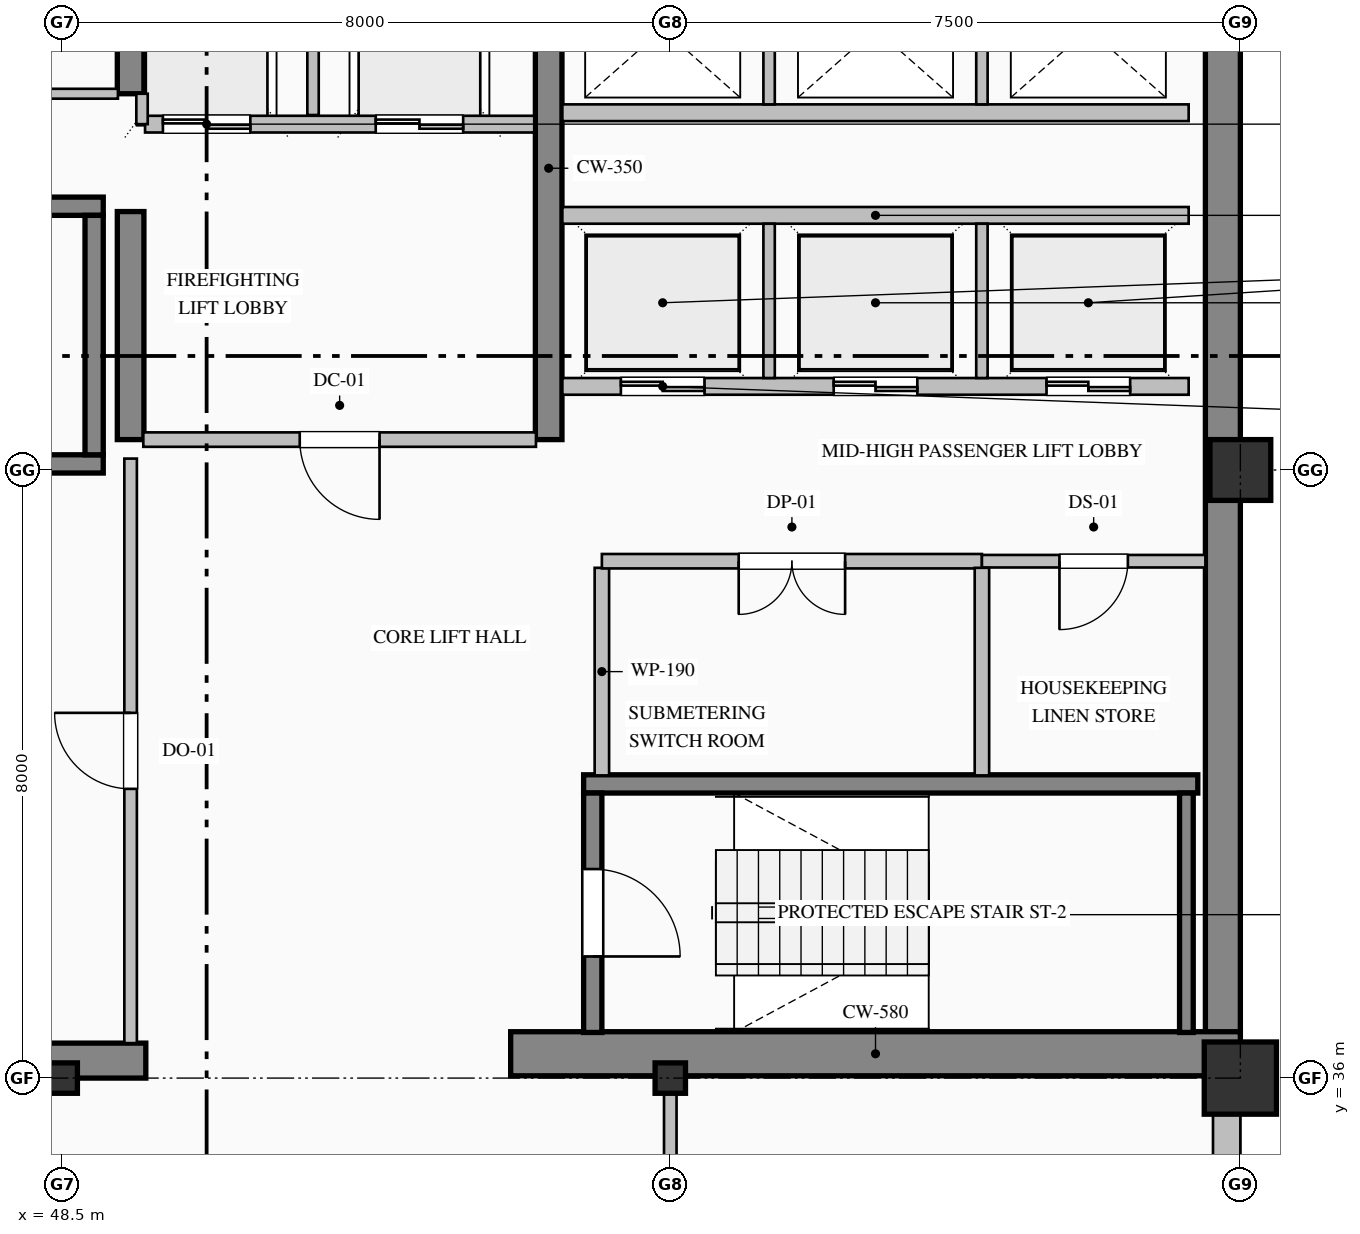
"""IFC4 building model, lengths in metres.
Left out: names, types, materials, properties, quantities, classifications, styles, units other than length and angle.
Written with IfcOpenShell. Run it as: python <this file> out.ifc"""

import sys

from ifc_helpers import new_model, si_unit, direction, frame, frame_2d, origin, origin_2d, place, context, subcontext, project, spatial, rectangle, hollow_rectangle, i_section, extrude, element, fill, save


model = new_model("IFC4")
c1 = context("Model", 3, precision=1e-05, world=origin(), true_north=direction((0.0, 1.0)))
c2 = subcontext(c1, "Body", "Model", "MODEL_VIEW")
j1 = project(units=[si_unit("LENGTHUNIT", "METRE"), si_unit("PLANEANGLEUNIT", "RADIAN")], contexts=[c1])
p1 = place(None, origin())
s1 = spatial("IfcSite", under=j1, at=p1, CompositionType="ELEMENT")
p2 = place(p1, origin())
s2 = spatial("IfcBuilding", under=s1, at=p2, CompositionType="ELEMENT")
p3 = place(p2, frame((0.0, 0.0, 229.8)))
s3 = spatial("IfcBuildingStorey", under=s2, at=p3, CompositionType="ELEMENT", Elevation=229.8)
p4 = place(p3, frame((63.77, 36.32, 0.0), z_axis=(0.0, 0.0, 1.0), x_axis=(0.0, 1.0, 0.0)))
e1 = element("IfcWall", 1, at=p4, inside=s3, PredefinedType="SHEAR", context=c2, shape_type="SweptSolid", body=[
    extrude(rectangle(XDim=15.22, YDim=0.46, at=frame_2d((7.61, 0.0))), origin(), (0.0, 0.0, 1.0), 3.775),
])
p5 = place(p3, frame((40.5, 36.23, 0.0), z_axis=(0.0, 0.0, 1.0), x_axis=(1.0, 0.0, 0.0)))
e2 = element("IfcWall", 2, at=p5, inside=s3, PredefinedType="SHEAR", context=c2, shape_type="SweptSolid", body=[
    extrude(rectangle(XDim=9.1, YDim=0.46, at=frame_2d((4.55, 0.0))), origin(), (0.0, 0.0, 1.0), 3.775),
])
p6 = place(p3, frame((54.4, 36.32, 0.0), z_axis=(0.0, 0.0, 1.0), x_axis=(1.0, 0.0, 0.0)))
e3 = element("IfcWall", 3, at=p6, inside=s3, PredefinedType="SHEAR", context=c2, shape_type="SweptSolid", body=[
    extrude(rectangle(XDim=9.6, YDim=0.58, at=frame_2d((4.8, 0.0))), origin(), (0.0, 0.0, 1.0), 4.0),
])
p7 = place(p3, frame((49.4, 44.4, 0.0), z_axis=(0.0, 0.0, 1.0), x_axis=(0.0, 1.0, 0.0)))
e4 = element("IfcWall", 4, at=p7, inside=s3, PredefinedType="SHEAR", context=c2, shape_type="SweptSolid", body=[
    extrude(rectangle(XDim=3.0, YDim=0.35, at=frame_2d((1.5, 0.0))), origin(), (0.0, 0.0, 1.0), 3.775),
])
p8 = place(p3, frame((49.4, 48.95, 0.0), z_axis=(0.0, 0.0, 1.0), x_axis=(0.0, 1.0, 0.0)))
e5 = element("IfcWall", 5, at=p8, inside=s3, PredefinedType="SHEAR", context=c2, shape_type="SweptSolid", body=[
    extrude(rectangle(XDim=2.59, YDim=0.35, at=frame_2d((1.295, 0.0))), origin(), (0.0, 0.0, 1.0), 3.775),
])
p9 = place(p3, frame((54.9, 44.4, 0.0), z_axis=(0.0, 0.0, 1.0), x_axis=(0.0, 1.0, 0.0)))
e6 = element("IfcWall", 6, at=p9, inside=s3, PredefinedType="SHEAR", context=c2, shape_type="SweptSolid", body=[
    extrude(rectangle(XDim=7.14, YDim=0.35, at=frame_2d((3.57, 0.0))), origin(), (0.0, 0.0, 1.0), 3.775),
])
for number, where, z_axis, x_axis in (
    (7, (48.5, 36.0, 0.0), (0.0, 0.0, 1.0), (1.0, 0.0, 0.0)),
    (8, (56.5, 36.0, 0.0), (0.0, 0.0, 1.0), (1.0, 0.0, 0.0)),
):
    element("IfcColumn", number, at=place(p3, frame(where, z_axis=z_axis, x_axis=x_axis)), inside=s3, PredefinedType="COLUMN", context=c2, shape_type="SweptSolid", body=[
        extrude(i_section(OverallWidth=0.4, OverallDepth=0.4, WebThickness=0.013, FlangeThickness=0.021, FilletRadius=0.022, at=origin_2d()), origin(), (0.0, 0.0, 1.0), 4.0),
    ])
p10 = place(p3, frame((64.0, 36.0, 0.0), z_axis=(0.0, 0.0, 1.0), x_axis=(1.0, 0.0, 0.0)))
e9 = element("IfcColumn", 9, at=p10, inside=s3, PredefinedType="COLUMN", context=c2, shape_type="SweptSolid", body=[
    extrude(hollow_rectangle(XDim=0.95, YDim=0.95, WallThickness=0.036, at=origin_2d()), origin(), (0.0, 0.0, 1.0), 4.0),
])
p11 = place(p3, frame((64.0, 44.0, 0.0), z_axis=(0.0, 0.0, 1.0), x_axis=(1.0, 0.0, 0.0)))
e10 = element("IfcColumn", 10, at=p11, inside=s3, PredefinedType="COLUMN", context=c2, shape_type="SweptSolid", body=[
    extrude(hollow_rectangle(XDim=0.8, YDim=0.8, WallThickness=0.032, at=origin_2d()), origin(), (0.0, 0.0, 1.0), 4.0),
])
p12 = place(p3, frame((63.82, 36.05, 0.0), z_axis=(0.0, 0.0, 1.0), x_axis=(0.0, -1.0, 0.0)))
e11 = element("IfcWall", 11, at=p12, inside=s3, PredefinedType="SOLIDWALL", context=c2, shape_type="SweptSolid", body=[
    extrude(rectangle(XDim=19.55, YDim=0.36, at=frame_2d((9.775, 0.0))), origin(), (0.0, 0.0, 1.0), 3.325),
])
p13 = place(p12, frame((2.925, 0.0, 0.9)))
e12 = element("IfcOpeningElement", 12, at=p13, cuts=e11, PredefinedType="OPENING", context=c2, shape_type="SweptSolid", body=[
    extrude(rectangle(XDim=1.35, YDim=1.85, at=frame_2d((0.675, 0.925))), frame((0.0, 0.19, 0.0), z_axis=(0.0, -1.0, 0.0), x_axis=(1.0, 0.0, 0.0)), (0.0, 0.0, 1.0), 0.38),
])
p14 = place(p12, frame((10.2, 0.0, 0.9)))
e13 = element("IfcOpeningElement", 13, at=p14, cuts=e11, PredefinedType="OPENING", context=c2, shape_type="SweptSolid", body=[
    extrude(rectangle(XDim=1.2, YDim=1.85, at=frame_2d((0.6, 0.925))), frame((0.0, 0.19, 0.0), z_axis=(0.0, -1.0, 0.0), x_axis=(1.0, 0.0, 0.0)), (0.0, 0.0, 1.0), 0.38),
])
p15 = place(p12, frame((13.725, 0.0, 0.9)))
e14 = element("IfcOpeningElement", 14, at=p15, cuts=e11, PredefinedType="OPENING", context=c2, shape_type="SweptSolid", body=[
    extrude(rectangle(XDim=1.35, YDim=1.85, at=frame_2d((0.675, 0.925))), frame((0.0, 0.19, 0.0), z_axis=(0.0, -1.0, 0.0), x_axis=(1.0, 0.0, 0.0)), (0.0, 0.0, 1.0), 0.38),
])
for number, where, z_axis, x_axis in (
    (15, (40.96, 47.47, 0.0), (0.0, 0.0, 1.0), (1.0, 0.0, 0.0)),
    (16, (49.04, 44.08, 0.0), (0.0, 0.0, 1.0), (-1.0, 0.0, 0.0)),
):
    element("IfcWall", number, at=place(p3, frame(where, z_axis=z_axis, x_axis=x_axis)), inside=s3, PredefinedType="SOLIDWALL", context=c2, shape_type="SweptSolid", body=[
        extrude(rectangle(XDim=8.08, YDim=0.24, at=frame_2d((4.04, 0.0))), origin(), (0.0, 0.0, 1.0), 4.0),
    ])
p16 = place(p3, frame((48.92, 44.2, 0.0), z_axis=(0.0, 0.0, 1.0), x_axis=(0.0, 1.0, 0.0)))
e17 = element("IfcWall", 17, at=p16, inside=s3, PredefinedType="SOLIDWALL", context=c2, shape_type="SweptSolid", body=[
    extrude(rectangle(XDim=3.15, YDim=0.24, at=frame_2d((1.575, 0.0))), origin(), (0.0, 0.0, 1.0), 4.0),
])
p17 = place(p3, frame((55.36, 39.87, 0.0), z_axis=(0.0, 0.0, 1.0), x_axis=(1.0, 0.0, 0.0)))
e18 = element("IfcWall", 18, at=p17, inside=s3, PredefinedType="SOLIDWALL", context=c2, shape_type="SweptSolid", body=[
    extrude(rectangle(XDim=8.08, YDim=0.24, at=frame_2d((4.04, 0.0))), origin(), (0.0, 0.0, 1.0), 4.0),
])
p18 = place(p3, frame((55.48, 39.75, 0.0), z_axis=(0.0, 0.0, 1.0), x_axis=(0.0, -1.0, 0.0)))
e19 = element("IfcWall", 19, at=p18, inside=s3, PredefinedType="SOLIDWALL", context=c2, shape_type="SweptSolid", body=[
    extrude(rectangle(XDim=3.15, YDim=0.24, at=frame_2d((1.575, 0.0))), origin(), (0.0, 0.0, 1.0), 4.0),
])
p19 = place(p18, frame((1.0, 0.0, 0.0)))
e20 = element("IfcOpeningElement", 20, at=p19, cuts=e19, PredefinedType="OPENING", context=c2, shape_type="SweptSolid", body=[
    extrude(rectangle(XDim=1.15, YDim=2.2, at=frame_2d((0.575, 1.1))), frame((0.0, 0.13, 0.0), z_axis=(0.0, -1.0, 0.0), x_axis=(1.0, 0.0, 0.0)), (0.0, 0.0, 1.0), 0.26),
])
p20 = place(p3, frame((63.29, 36.6, 0.0), z_axis=(0.0, 0.0, 1.0), x_axis=(0.0, 1.0, 0.0)))
e21 = element("IfcWall", 21, at=p20, inside=s3, PredefinedType="SOLIDWALL", context=c2, shape_type="SweptSolid", body=[
    extrude(rectangle(XDim=3.15, YDim=0.18, at=frame_2d((1.575, 0.0))), origin(), (0.0, 0.0, 1.0), 4.0),
])
p21 = place(p3, frame((54.71, 48.55, 0.0), z_axis=(0.0, 0.0, 1.0), x_axis=(-1.0, 0.0, 0.0)))
e22 = element("IfcWall", 22, at=p21, inside=s3, PredefinedType="PARTITIONING", context=c2, shape_type="SweptSolid", body=[
    extrude(rectangle(XDim=5.12, YDim=0.22, at=frame_2d((2.56, 0.0))), origin(), (0.0, 0.0, 1.0), 3.775),
])
p22 = place(p21, frame((3.735, 0.0, 0.0)))
e23 = element("IfcOpeningElement", 23, at=p22, cuts=e22, PredefinedType="OPENING", context=c2, shape_type="SweptSolid", body=[
    extrude(rectangle(XDim=1.15, YDim=2.2, at=frame_2d((0.575, 1.1))), frame((0.0, 0.12, 0.0), z_axis=(0.0, -1.0, 0.0), x_axis=(1.0, 0.0, 0.0)), (0.0, 0.0, 1.0), 0.24),
])
p23 = place(p21, frame((0.935, 0.0, 0.0)))
e24 = element("IfcOpeningElement", 24, at=p23, cuts=e22, PredefinedType="OPENING", context=c2, shape_type="SweptSolid", body=[
    extrude(rectangle(XDim=1.15, YDim=2.2, at=frame_2d((0.575, 1.1))), frame((0.0, 0.12, 0.0), z_axis=(0.0, -1.0, 0.0), x_axis=(1.0, 0.0, 0.0)), (0.0, 0.0, 1.0), 0.24),
])
p24 = place(p3, frame((51.8, 48.67, 0.0), z_axis=(0.0, 0.0, 1.0), x_axis=(0.0, 1.0, 0.0)))
e25 = element("IfcWall", 25, at=p24, inside=s3, PredefinedType="PARTITIONING", context=c2, shape_type="SweptSolid", body=[
    extrude(rectangle(XDim=2.87, YDim=0.15, at=frame_2d((1.435, 0.0))), origin(), (0.0, 0.0, 1.0), 3.775),
])
p25 = place(p3, frame((49.55, 48.55, 0.0), z_axis=(0.0, 0.0, 1.0), x_axis=(0.0, 1.0, 0.0)))
e26 = element("IfcWall", 26, at=p25, inside=s3, PredefinedType="PARTITIONING", context=c2, shape_type="SweptSolid", body=[
    extrude(rectangle(XDim=0.4, YDim=0.15, at=frame_2d((0.2, 0.0))), origin(), (0.0, 0.0, 1.0), 3.775),
])
p26 = place(p3, frame((63.32, 45.1, 0.0), z_axis=(0.0, 0.0, 1.0), x_axis=(-1.0, 0.0, 0.0)))
e27 = element("IfcWall", 27, at=p26, inside=s3, PredefinedType="PARTITIONING", context=c2, shape_type="SweptSolid", body=[
    extrude(rectangle(XDim=8.24, YDim=0.22, at=frame_2d((4.12, 0.0))), origin(), (0.0, 0.0, 1.0), 3.775),
])
p27 = place(p26, frame((6.37, 0.0, 0.0)))
e28 = element("IfcOpeningElement", 28, at=p27, cuts=e27, PredefinedType="OPENING", context=c2, shape_type="SweptSolid", body=[
    extrude(rectangle(XDim=1.1, YDim=2.2, at=frame_2d((0.55, 1.1))), frame((0.0, 0.12, 0.0), z_axis=(0.0, -1.0, 0.0), x_axis=(1.0, 0.0, 0.0)), (0.0, 0.0, 1.0), 0.24),
])
p28 = place(p26, frame((3.57, 0.0, 0.0)))
e29 = element("IfcOpeningElement", 29, at=p28, cuts=e27, PredefinedType="OPENING", context=c2, shape_type="SweptSolid", body=[
    extrude(rectangle(XDim=1.1, YDim=2.2, at=frame_2d((0.55, 1.1))), frame((0.0, 0.12, 0.0), z_axis=(0.0, -1.0, 0.0), x_axis=(1.0, 0.0, 0.0)), (0.0, 0.0, 1.0), 0.24),
])
p29 = place(p26, frame((0.77, 0.0, 0.0)))
e30 = element("IfcOpeningElement", 30, at=p29, cuts=e27, PredefinedType="OPENING", context=c2, shape_type="SweptSolid", body=[
    extrude(rectangle(XDim=1.1, YDim=2.2, at=frame_2d((0.55, 1.1))), frame((0.0, 0.12, 0.0), z_axis=(0.0, -1.0, 0.0), x_axis=(1.0, 0.0, 0.0)), (0.0, 0.0, 1.0), 0.24),
])
p30 = place(p3, frame((55.08, 47.35, 0.0), z_axis=(0.0, 0.0, 1.0), x_axis=(1.0, 0.0, 0.0)))
e31 = element("IfcWall", 31, at=p30, inside=s3, PredefinedType="PARTITIONING", context=c2, shape_type="SweptSolid", body=[
    extrude(rectangle(XDim=8.24, YDim=0.22, at=frame_2d((4.12, 0.0))), origin(), (0.0, 0.0, 1.0), 3.775),
])
for number, where, z_axis, x_axis in (
    (32, (57.8, 45.21, 0.0), (0.0, 0.0, 1.0), (0.0, 1.0, 0.0)),
    (33, (60.6, 45.21, 0.0), (0.0, 0.0, 1.0), (0.0, 1.0, 0.0)),
):
    element("IfcWall", number, at=place(p3, frame(where, z_axis=z_axis, x_axis=x_axis)), inside=s3, PredefinedType="PARTITIONING", context=c2, shape_type="SweptSolid", body=[
        extrude(rectangle(XDim=2.03, YDim=0.15, at=frame_2d((1.015, 0.0))), origin(), (0.0, 0.0, 1.0), 3.775),
    ])
p31 = place(p3, frame((63.32, 48.7, 0.0), z_axis=(0.0, 0.0, 1.0), x_axis=(-1.0, 0.0, 0.0)))
e34 = element("IfcWall", 34, at=p31, inside=s3, PredefinedType="PARTITIONING", context=c2, shape_type="SweptSolid", body=[
    extrude(rectangle(XDim=8.24, YDim=0.22, at=frame_2d((4.12, 0.0))), origin(), (0.0, 0.0, 1.0), 3.775),
])
for number, where, z_axis, x_axis in (
    (35, (57.8, 48.81, 0.0), (0.0, 0.0, 1.0), (0.0, 1.0, 0.0)),
    (36, (60.6, 48.81, 0.0), (0.0, 0.0, 1.0), (0.0, 1.0, 0.0)),
):
    element("IfcWall", number, at=place(p3, frame(where, z_axis=z_axis, x_axis=x_axis)), inside=s3, PredefinedType="PARTITIONING", context=c2, shape_type="SweptSolid", body=[
        extrude(rectangle(XDim=2.73, YDim=0.15, at=frame_2d((1.365, 0.0))), origin(), (0.0, 0.0, 1.0), 3.775),
    ])
p32 = place(p3, frame((43.5, 48.95, 0.0), z_axis=(0.0, 0.0, 1.0), x_axis=(1.0, 0.0, 0.0)))
e37 = element("IfcWall", 37, at=p32, inside=s3, PredefinedType="PARTITIONING", context=c2, shape_type="SweptSolid", body=[
    extrude(rectangle(XDim=5.733, YDim=0.13, at=frame_2d((2.866, 0.0))), origin(), (0.0, 0.0, 1.0), 3.775),
])
p33 = place(p32, frame((2.406, 0.0, 0.0)))
e38 = element("IfcOpeningElement", 38, at=p33, cuts=e37, PredefinedType="OPENING", context=c2, shape_type="SweptSolid", body=[
    extrude(rectangle(XDim=0.92, YDim=2.15, at=frame_2d((0.46, 1.075))), frame((0.0, 0.075, 0.0), z_axis=(0.0, -1.0, 0.0), x_axis=(1.0, 0.0, 0.0)), (0.0, 0.0, 1.0), 0.15),
])
p34 = place(p3, frame((54.733, 44.4, 0.0), z_axis=(0.0, 0.0, 1.0), x_axis=(-1.0, 0.0, 0.0)))
e39 = element("IfcWall", 39, at=p34, inside=s3, PredefinedType="PARTITIONING", context=c2, shape_type="SweptSolid", body=[
    extrude(rectangle(XDim=5.166, YDim=0.19, at=frame_2d((2.583, 0.0))), origin(), (0.0, 0.0, 1.0), 3.775),
])
p35 = place(p34, frame((2.058, 0.0, 0.0)))
e40 = element("IfcOpeningElement", 40, at=p35, cuts=e39, PredefinedType="OPENING", context=c2, shape_type="SweptSolid", body=[
    extrude(rectangle(XDim=1.05, YDim=2.15, at=frame_2d((0.525, 1.075))), frame((0.0, 0.105, 0.0), z_axis=(0.0, -1.0, 0.0), x_axis=(1.0, 0.0, 0.0)), (0.0, 0.0, 1.0), 0.21),
])
p36 = place(p3, frame((49.4, 36.46, 0.0), z_axis=(0.0, 0.0, 1.0), x_axis=(0.0, 1.0, 0.0)))
e41 = element("IfcWall", 41, at=p36, inside=s3, PredefinedType="PARTITIONING", context=c2, shape_type="SweptSolid", body=[
    extrude(rectangle(XDim=7.69, YDim=0.165, at=frame_2d((3.845, 0.0))), origin(), (0.0, 0.0, 1.0), 3.017),
])
p37 = place(p36, frame((3.345, 0.0, 0.0)))
e42 = element("IfcOpeningElement", 42, at=p37, cuts=e41, PredefinedType="OPENING", context=c2, shape_type="SweptSolid", body=[
    extrude(rectangle(XDim=1.0, YDim=2.15, at=frame_2d((0.5, 1.075))), frame((0.0, 0.093, 0.0), z_axis=(0.0, -1.0, 0.0), x_axis=(1.0, 0.0, 0.0)), (0.0, 0.0, 1.0), 0.185),
])
p38 = place(p3, frame((55.6, 42.713, 0.0), z_axis=(0.0, 0.0, 1.0), x_axis=(0.0, -1.0, 0.0)))
e43 = element("IfcWall", 43, at=p38, inside=s3, PredefinedType="PARTITIONING", context=c2, shape_type="SweptSolid", body=[
    extrude(rectangle(XDim=2.731, YDim=0.19, at=frame_2d((1.365, 0.0))), origin(), (0.0, 0.0, 1.0), 3.775),
])
p39 = place(p3, frame((60.6, 42.8, 0.0), z_axis=(0.0, 0.0, 1.0), x_axis=(-1.0, 0.0, 0.0)))
e44 = element("IfcWall", 44, at=p39, inside=s3, PredefinedType="PARTITIONING", context=c2, shape_type="SweptSolid", body=[
    extrude(rectangle(XDim=5.0, YDim=0.19, at=frame_2d((2.5, 0.0))), origin(), (0.0, 0.0, 1.0), 3.775),
])
p40 = place(p39, frame((1.8, 0.0, 0.0)))
e45 = element("IfcOpeningElement", 45, at=p40, cuts=e44, PredefinedType="OPENING", context=c2, shape_type="SweptSolid", body=[
    extrude(rectangle(XDim=1.4, YDim=2.25, at=frame_2d((0.7, 1.125))), frame((0.0, 0.105, 0.0), z_axis=(0.0, -1.0, 0.0), x_axis=(1.0, 0.0, 0.0)), (0.0, 0.0, 1.0), 0.21),
])
p41 = place(p3, frame((63.54, 42.8, 0.0), z_axis=(0.0, 0.0, 1.0), x_axis=(-1.0, 0.0, 0.0)))
e46 = element("IfcWall", 46, at=p41, inside=s3, PredefinedType="PARTITIONING", context=c2, shape_type="SweptSolid", body=[
    extrude(rectangle(XDim=2.94, YDim=0.165, at=frame_2d((1.47, 0.0))), origin(), (0.0, 0.0, 1.0), 3.775),
])
p42 = place(p41, frame((1.02, 0.0, 0.0)))
e47 = element("IfcOpeningElement", 47, at=p42, cuts=e46, PredefinedType="OPENING", context=c2, shape_type="SweptSolid", body=[
    extrude(rectangle(XDim=0.9, YDim=2.15, at=frame_2d((0.45, 1.075))), frame((0.0, 0.093, 0.0), z_axis=(0.0, -1.0, 0.0), x_axis=(1.0, 0.0, 0.0)), (0.0, 0.0, 1.0), 0.185),
])
p43 = place(p3, frame((60.6, 42.713, 0.0), z_axis=(0.0, 0.0, 1.0), x_axis=(0.0, -1.0, 0.0)))
e48 = element("IfcWall", 48, at=p43, inside=s3, PredefinedType="PARTITIONING", context=c2, shape_type="SweptSolid", body=[
    extrude(rectangle(XDim=2.731, YDim=0.19, at=frame_2d((1.365, 0.0))), origin(), (0.0, 0.0, 1.0), 3.775),
])
p44 = place(p3, frame((56.5, 36.0, 0.0), z_axis=(0.0, 0.0, 1.0), x_axis=(0.0, -1.0, 0.0)))
e49 = element("IfcWall", 49, at=p44, inside=s3, PredefinedType="PARTITIONING", context=c2, shape_type="SweptSolid", body=[
    extrude(rectangle(XDim=5.525, YDim=0.165, at=frame_2d((2.763, 0.0))), origin(), (0.0, 0.0, 1.0), 3.179),
])
p45 = place(p19, origin())
e50 = element("IfcDoor", 50, at=p45, inside=s3, OperationType="SINGLE_SWING_RIGHT", PredefinedType="DOOR", context=c2, shape_type="SweptSolid", body=[
    extrude(rectangle(XDim=1.15, YDim=2.2, at=frame_2d((0.575, 1.1))), frame((0.0, 0.025, 0.0), z_axis=(0.0, -1.0, 0.0), x_axis=(1.0, 0.0, 0.0)), (0.0, 0.0, 1.0), 0.05),
])
fill(e20, e50)
p46 = place(p22, origin())
e51 = element("IfcDoor", 51, at=p46, inside=s3, OperationType="DOUBLE_DOOR_SLIDING", PredefinedType="DOOR", context=c2, shape_type="SweptSolid", body=[
    extrude(rectangle(XDim=1.15, YDim=2.2, at=frame_2d((0.575, 1.1))), frame((0.0, 0.025, 0.0), z_axis=(0.0, -1.0, 0.0), x_axis=(1.0, 0.0, 0.0)), (0.0, 0.0, 1.0), 0.05),
])
fill(e23, e51)
p47 = place(p23, origin())
e52 = element("IfcDoor", 52, at=p47, inside=s3, OperationType="DOUBLE_DOOR_SLIDING", PredefinedType="DOOR", context=c2, shape_type="SweptSolid", body=[
    extrude(rectangle(XDim=1.15, YDim=2.2, at=frame_2d((0.575, 1.1))), frame((0.0, 0.025, 0.0), z_axis=(0.0, -1.0, 0.0), x_axis=(1.0, 0.0, 0.0)), (0.0, 0.0, 1.0), 0.05),
])
fill(e24, e52)
p48 = place(p27, origin())
e53 = element("IfcDoor", 53, at=p48, inside=s3, OperationType="DOUBLE_DOOR_SLIDING", PredefinedType="DOOR", context=c2, shape_type="SweptSolid", body=[
    extrude(rectangle(XDim=1.1, YDim=2.2, at=frame_2d((0.55, 1.1))), frame((0.0, 0.025, 0.0), z_axis=(0.0, -1.0, 0.0), x_axis=(1.0, 0.0, 0.0)), (0.0, 0.0, 1.0), 0.05),
])
fill(e28, e53)
p49 = place(p28, origin())
e54 = element("IfcDoor", 54, at=p49, inside=s3, OperationType="DOUBLE_DOOR_SLIDING", PredefinedType="DOOR", context=c2, shape_type="SweptSolid", body=[
    extrude(rectangle(XDim=1.1, YDim=2.2, at=frame_2d((0.55, 1.1))), frame((0.0, 0.025, 0.0), z_axis=(0.0, -1.0, 0.0), x_axis=(1.0, 0.0, 0.0)), (0.0, 0.0, 1.0), 0.05),
])
fill(e29, e54)
p50 = place(p29, origin())
e55 = element("IfcDoor", 55, at=p50, inside=s3, OperationType="DOUBLE_DOOR_SLIDING", PredefinedType="DOOR", context=c2, shape_type="SweptSolid", body=[
    extrude(rectangle(XDim=1.1, YDim=2.2, at=frame_2d((0.55, 1.1))), frame((0.0, 0.025, 0.0), z_axis=(0.0, -1.0, 0.0), x_axis=(1.0, 0.0, 0.0)), (0.0, 0.0, 1.0), 0.05),
])
fill(e30, e55)
p51 = place(p35, origin())
e56 = element("IfcDoor", 56, at=p51, inside=s3, OperationType="SINGLE_SWING_LEFT", PredefinedType="DOOR", context=c2, shape_type="SweptSolid", body=[
    extrude(rectangle(XDim=1.05, YDim=2.15, at=frame_2d((0.525, 1.075))), frame((0.0, 0.025, 0.0), z_axis=(0.0, -1.0, 0.0), x_axis=(1.0, 0.0, 0.0)), (0.0, 0.0, 1.0), 0.05),
])
fill(e40, e56)
p52 = place(p37, origin())
e57 = element("IfcDoor", 57, at=p52, inside=s3, OperationType="SINGLE_SWING_RIGHT", PredefinedType="DOOR", context=c2, shape_type="SweptSolid", body=[
    extrude(rectangle(XDim=1.0, YDim=2.15, at=frame_2d((0.5, 1.075))), frame((0.0, 0.025, 0.0), z_axis=(0.0, -1.0, 0.0), x_axis=(1.0, 0.0, 0.0)), (0.0, 0.0, 1.0), 0.05),
])
fill(e42, e57)
p53 = place(p40, origin())
e58 = element("IfcDoor", 58, at=p53, inside=s3, OperationType="DOUBLE_DOOR_SINGLE_SWING", PredefinedType="DOOR", context=c2, shape_type="SweptSolid", body=[
    extrude(rectangle(XDim=1.4, YDim=2.25, at=frame_2d((0.7, 1.125))), frame((0.0, 0.025, 0.0), z_axis=(0.0, -1.0, 0.0), x_axis=(1.0, 0.0, 0.0)), (0.0, 0.0, 1.0), 0.05),
])
fill(e45, e58)
p54 = place(p42, origin())
e59 = element("IfcDoor", 59, at=p54, inside=s3, OperationType="SINGLE_SWING_RIGHT", PredefinedType="DOOR", context=c2, shape_type="SweptSolid", body=[
    extrude(rectangle(XDim=0.9, YDim=2.15, at=frame_2d((0.45, 1.075))), frame((0.0, 0.025, 0.0), z_axis=(0.0, -1.0, 0.0), x_axis=(1.0, 0.0, 0.0)), (0.0, 0.0, 1.0), 0.05),
])
fill(e47, e59)
save(model, sys.argv[1])
